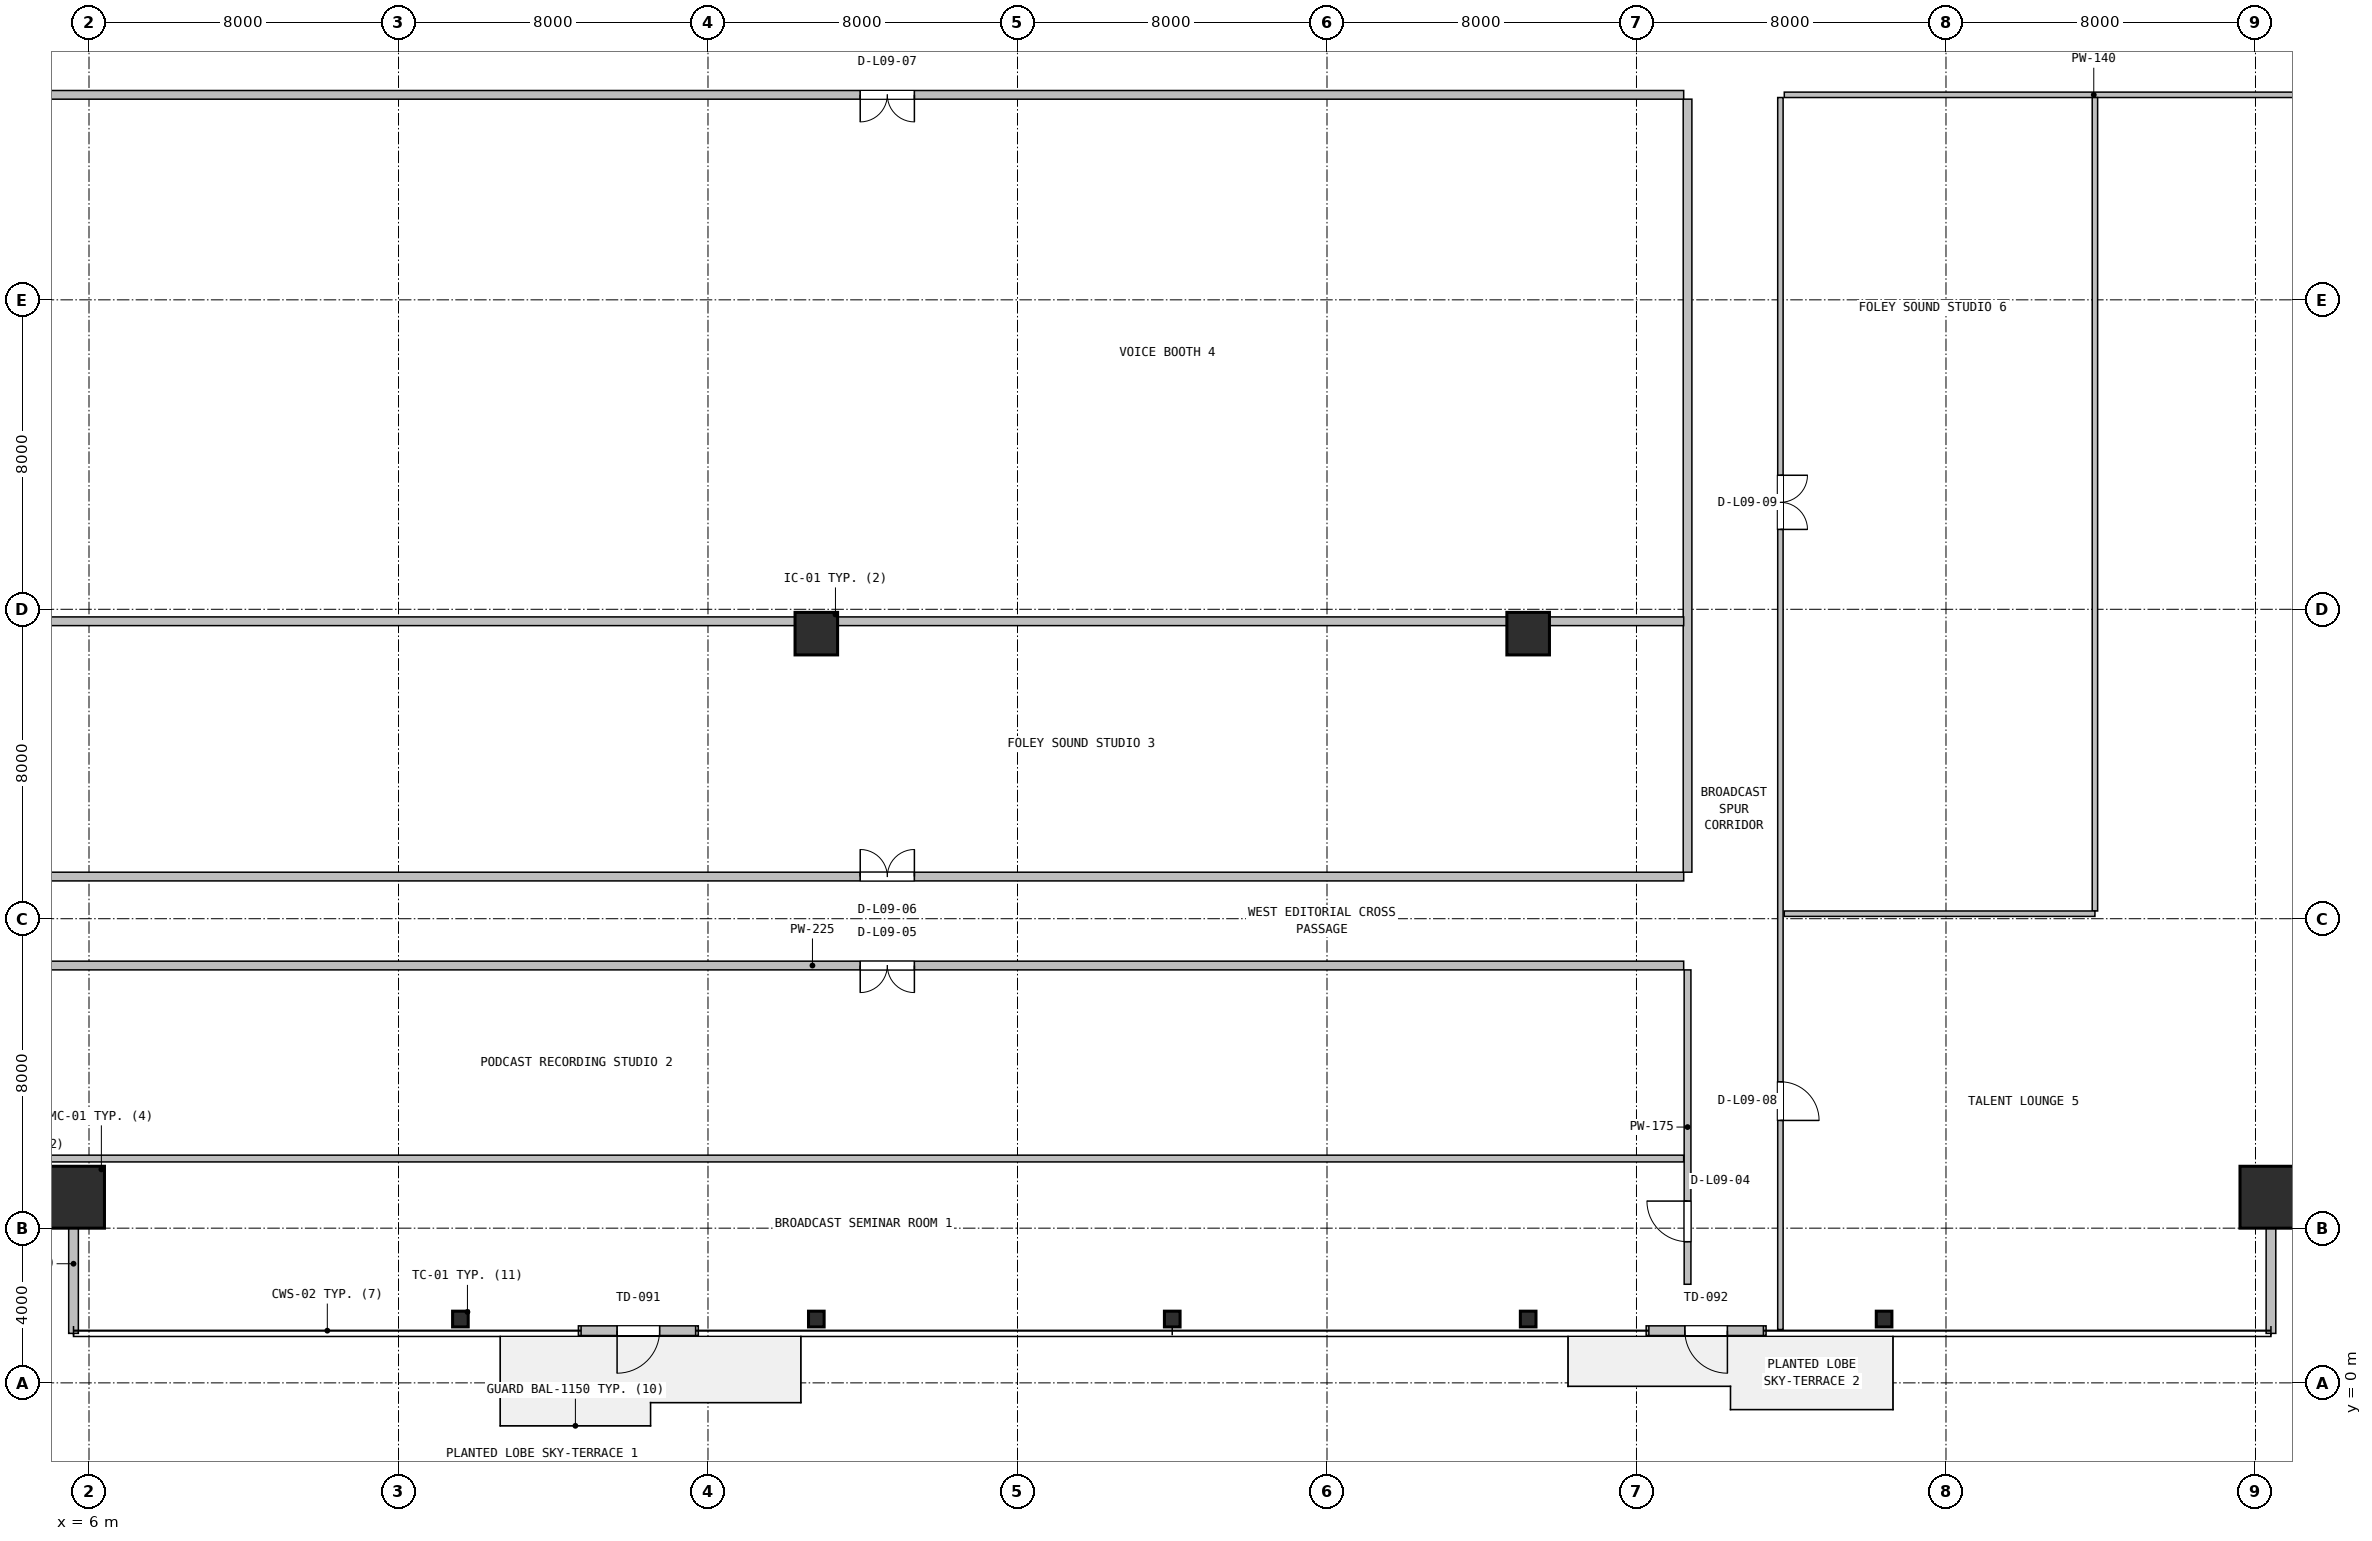
"""IFC4 building model, lengths in metres.
Left out: names, types, materials, properties, quantities, classifications, styles, units other than length and angle.
Written with IfcOpenShell. Run it as: python <this file> out.ifc"""

import sys

from ifc_helpers import new_model, si_unit, direction, frame, frame_2d, origin, origin_2d, place, context, subcontext, project, spatial, rectangle, hollow_rectangle, i_section, extrude, source, transform, mapped, element, fill, save


model = new_model("IFC4")
c1 = context("Model", 3, precision=1e-05, world=origin(), true_north=direction((0.0, 1.0)))
c2 = subcontext(c1, "Body", "Model", "MODEL_VIEW")
j1 = project(units=[si_unit("LENGTHUNIT", "METRE"), si_unit("PLANEANGLEUNIT", "RADIAN")], contexts=[c1])
p1 = place(None, origin())
s1 = spatial("IfcSite", under=j1, at=p1, CompositionType="ELEMENT")
p2 = place(p1, origin())
s2 = spatial("IfcBuilding", under=s1, at=p2, CompositionType="ELEMENT")
p3 = place(p2, frame((0.0, 0.0, 43.2)))
s3 = spatial("IfcBuildingStorey", under=s2, at=p3, CompositionType="ELEMENT", Elevation=43.2)
m1 = source(origin(), c2, "Body", "SweptSolid", [
    extrude(hollow_rectangle(XDim=1.6, YDim=1.6, WallThickness=0.06, at=origin_2d()), origin(), (0.0, 0.0, 1.0), 3.9),
])
for number, where, z_axis, x_axis in (
    (1, (5.6, 4.8, 0.0), (0.0, 0.0, 1.0), (1.0, 0.0, 0.0)),
    (2, (62.4, 4.8, 0.0), (0.0, 0.0, 1.0), (1.0, 0.0, 0.0)),
):
    element("IfcColumn", number, at=place(p3, frame(where, z_axis=z_axis, x_axis=x_axis)), inside=s3, PredefinedType="COLUMN", context=c2, shape_type="MappedRepresentation", body=[
        mapped(m1, transform((0.0, 0.0, 0.0), x_axis=(1.0, 0.0, 0.0), y_axis=(0.0, 1.0, 0.0), z_axis=(0.0, 0.0, 1.0), scale=1.0)),
    ])
m2 = source(origin(), c2, "Body", "SweptSolid", [
    extrude(i_section(OverallWidth=0.404, OverallDepth=0.407, WebThickness=0.027, FlangeThickness=0.044, FilletRadius=0.018, at=origin_2d()), origin(), (0.0, 0.0, 1.0), 3.9),
])
for number, where, z_axis, x_axis in (
    (3, (15.6, 1.65, 0.0), (0.0, 0.0, 1.0), (1.0, 0.0, 0.0)),
    (4, (24.8, 1.65, 0.0), (0.0, 0.0, 1.0), (1.0, 0.0, 0.0)),
    (5, (34.0, 1.65, 0.0), (0.0, 0.0, 1.0), (1.0, 0.0, 0.0)),
    (6, (43.2, 1.65, 0.0), (0.0, 0.0, 1.0), (1.0, 0.0, 0.0)),
    (7, (52.4, 1.65, 0.0), (0.0, 0.0, 1.0), (1.0, 0.0, 0.0)),
):
    element("IfcColumn", number, at=place(p3, frame(where, z_axis=z_axis, x_axis=x_axis)), inside=s3, PredefinedType="COLUMN", context=c2, shape_type="MappedRepresentation", body=[
        mapped(m2, transform((0.0, 0.0, 0.0), x_axis=(1.0, 0.0, 0.0), y_axis=(0.0, 1.0, 0.0), z_axis=(0.0, 0.0, 1.0), scale=1.0)),
    ])
m3 = source(origin(), c2, "Body", "SweptSolid", [
    extrude(rectangle(XDim=1.1, YDim=1.1, at=origin_2d()), origin(), (0.0, 0.0, 1.0), 3.9),
])
for number, where, z_axis, x_axis in (
    (8, (24.8, 19.37, 0.0), (0.0, 0.0, 1.0), (1.0, 0.0, 0.0)),
    (9, (43.2, 19.37, 0.0), (0.0, 0.0, 1.0), (1.0, 0.0, 0.0)),
):
    element("IfcColumn", number, at=place(p3, frame(where, z_axis=z_axis, x_axis=x_axis)), inside=s3, PredefinedType="COLUMN", context=c2, shape_type="MappedRepresentation", body=[
        mapped(m3, transform((0.0, 0.0, 0.0), x_axis=(1.0, 0.0, 0.0), y_axis=(0.0, 1.0, 0.0), z_axis=(0.0, 0.0, 1.0), scale=1.0)),
    ])
p4 = place(p3, frame((18.65, 1.35, 0.0), z_axis=(0.0, 0.0, 1.0), x_axis=(1.0, 0.0, 0.0)))
e10 = element("IfcWall", 10, at=p4, inside=s3, PredefinedType="SOLIDWALL", context=c2, shape_type="SweptSolid", body=[
    extrude(rectangle(XDim=3.1, YDim=0.25, at=frame_2d((1.55, 0.0))), origin(), (0.0, 0.0, 1.0), 3.63),
])
p5 = place(p4, frame((1.0, 0.0, 0.0)))
e11 = element("IfcOpeningElement", 11, at=p5, cuts=e10, PredefinedType="OPENING", context=c2, shape_type="SweptSolid", body=[
    extrude(rectangle(XDim=1.1, YDim=2.15, at=frame_2d((0.55, 1.075))), frame((0.0, 0.135, 0.0), z_axis=(0.0, -1.0, 0.0), x_axis=(1.0, 0.0, 0.0)), (0.0, 0.0, 1.0), 0.27),
])
p6 = place(p3, frame((46.25, 1.35, 0.0), z_axis=(0.0, 0.0, 1.0), x_axis=(1.0, 0.0, 0.0)))
e12 = element("IfcWall", 12, at=p6, inside=s3, PredefinedType="SOLIDWALL", context=c2, shape_type="SweptSolid", body=[
    extrude(rectangle(XDim=3.1, YDim=0.25, at=frame_2d((1.55, 0.0))), origin(), (0.0, 0.0, 1.0), 3.63),
])
p7 = place(p6, frame((1.0, 0.0, 0.0)))
e13 = element("IfcOpeningElement", 13, at=p7, cuts=e12, PredefinedType="OPENING", context=c2, shape_type="SweptSolid", body=[
    extrude(rectangle(XDim=1.1, YDim=2.15, at=frame_2d((0.55, 1.075))), frame((0.0, 0.135, 0.0), z_axis=(0.0, -1.0, 0.0), x_axis=(1.0, 0.0, 0.0)), (0.0, 0.0, 1.0), 0.27),
])
for number, where, z_axis, x_axis in (
    (14, (5.6, 1.28, 0.0), (0.0, 0.0, 1.0), (0.0, 1.0, 0.0)),
    (15, (62.4, 1.28, 0.0), (0.0, 0.0, 1.0), (0.0, 1.0, 0.0)),
):
    element("IfcWall", number, at=place(p3, frame(where, z_axis=z_axis, x_axis=x_axis)), inside=s3, PredefinedType="SOLIDWALL", context=c2, shape_type="SweptSolid", body=[
        extrude(rectangle(XDim=3.6, YDim=0.25, at=frame_2d((1.8, 0.0))), origin(), (0.0, 0.0, 1.0), 3.208),
    ])
p8 = place(p3, frame((47.32, 2.55, 0.0), z_axis=(0.0, 0.0, 1.0), x_axis=(0.0, 1.0, 0.0)))
e16 = element("IfcWall", 16, at=p8, inside=s3, PredefinedType="PARTITIONING", context=c2, shape_type="SweptSolid", body=[
    extrude(rectangle(XDim=8.127, YDim=0.175, at=frame_2d((4.063, 0.0))), origin(), (0.0, 0.0, 1.0), 3.322),
])
p9 = place(p8, frame((1.1, 0.0, 0.0)))
e17 = element("IfcOpeningElement", 17, at=p9, cuts=e16, PredefinedType="OPENING", context=c2, shape_type="SweptSolid", body=[
    extrude(rectangle(XDim=1.05, YDim=2.1, at=frame_2d((0.525, 1.05))), frame((0.0, 0.098, 0.0), z_axis=(0.0, -1.0, 0.0), x_axis=(1.0, 0.0, 0.0)), (0.0, 0.0, 1.0), 0.195),
])
p10 = place(p3, frame((2.18, 5.8, 0.0), z_axis=(0.0, 0.0, 1.0), x_axis=(1.0, 0.0, 0.0)))
e18 = element("IfcWall", 18, at=p10, inside=s3, PredefinedType="PARTITIONING", context=c2, shape_type="SweptSolid", body=[
    extrude(rectangle(XDim=45.04, YDim=0.175, at=frame_2d((22.52, 0.0))), origin(), (0.0, 0.0, 1.0), 2.852),
])
p11 = place(p3, frame((2.18, 10.79, 0.0), z_axis=(0.0, 0.0, 1.0), x_axis=(1.0, 0.0, 0.0)))
e19 = element("IfcWall", 19, at=p11, inside=s3, PredefinedType="PARTITIONING", context=c2, shape_type="SweptSolid", body=[
    extrude(rectangle(XDim=45.04, YDim=0.225, at=frame_2d((22.52, 0.0))), origin(), (0.0, 0.0, 1.0), 2.852),
])
p12 = place(p11, frame((23.755, 0.0, 0.0)))
e20 = element("IfcOpeningElement", 20, at=p12, cuts=e19, PredefinedType="OPENING", context=c2, shape_type="SweptSolid", body=[
    extrude(rectangle(XDim=1.4, YDim=2.12, at=frame_2d((0.7, 1.06))), frame((0.0, 0.123, 0.0), z_axis=(0.0, -1.0, 0.0), x_axis=(1.0, 0.0, 0.0)), (0.0, 0.0, 1.0), 0.245),
])
p13 = place(p3, frame((2.18, 13.09, 0.0), z_axis=(0.0, 0.0, 1.0), x_axis=(1.0, 0.0, 0.0)))
e21 = element("IfcWall", 21, at=p13, inside=s3, PredefinedType="PARTITIONING", context=c2, shape_type="SweptSolid", body=[
    extrude(rectangle(XDim=45.04, YDim=0.225, at=frame_2d((22.52, 0.0))), origin(), (0.0, 0.0, 1.0), 2.852),
])
p14 = place(p13, frame((23.755, 0.0, 0.0)))
e22 = element("IfcOpeningElement", 22, at=p14, cuts=e21, PredefinedType="OPENING", context=c2, shape_type="SweptSolid", body=[
    extrude(rectangle(XDim=1.4, YDim=2.12, at=frame_2d((0.7, 1.06))), frame((0.0, 0.123, 0.0), z_axis=(0.0, -1.0, 0.0), x_axis=(1.0, 0.0, 0.0)), (0.0, 0.0, 1.0), 0.245),
])
p15 = place(p3, frame((47.32, 13.203, 0.0), z_axis=(0.0, 0.0, 1.0), x_axis=(0.0, 1.0, 0.0)))
e23 = element("IfcWall", 23, at=p15, inside=s3, PredefinedType="PARTITIONING", context=c2, shape_type="SweptSolid", body=[
    extrude(rectangle(XDim=19.985, YDim=0.225, at=frame_2d((9.993, 0.0))), origin(), (0.0, 0.0, 1.0), 3.322),
])
p16 = place(p3, frame((2.18, 19.69, 0.0), z_axis=(0.0, 0.0, 1.0), x_axis=(1.0, 0.0, 0.0)))
e24 = element("IfcWall", 24, at=p16, inside=s3, PredefinedType="PARTITIONING", context=c2, shape_type="SweptSolid", body=[
    extrude(rectangle(XDim=45.04, YDim=0.225, at=frame_2d((22.52, 0.0))), origin(), (0.0, 0.0, 1.0), 2.852),
])
p17 = place(p3, frame((2.18, 33.3, 0.0), z_axis=(0.0, 0.0, 1.0), x_axis=(1.0, 0.0, 0.0)))
e25 = element("IfcWall", 25, at=p17, inside=s3, PredefinedType="PARTITIONING", context=c2, shape_type="SweptSolid", body=[
    extrude(rectangle(XDim=45.04, YDim=0.225, at=frame_2d((22.52, 0.0))), origin(), (0.0, 0.0, 1.0), 2.852),
])
p18 = place(p17, frame((23.755, 0.0, 0.0)))
e26 = element("IfcOpeningElement", 26, at=p18, cuts=e25, PredefinedType="OPENING", context=c2, shape_type="SweptSolid", body=[
    extrude(rectangle(XDim=1.4, YDim=2.12, at=frame_2d((0.7, 1.06))), frame((0.0, 0.123, 0.0), z_axis=(0.0, -1.0, 0.0), x_axis=(1.0, 0.0, 0.0)), (0.0, 0.0, 1.0), 0.245),
])
p19 = place(p3, frame((49.82, 33.3, 0.0), z_axis=(0.0, 0.0, 1.0), x_axis=(1.0, 0.0, 0.0)))
e27 = element("IfcWall", 27, at=p19, inside=s3, PredefinedType="PARTITIONING", context=c2, shape_type="SweptSolid", body=[
    extrude(rectangle(XDim=16.0, YDim=0.14, at=frame_2d((8.0, 0.0))), origin(), (0.0, 0.0, 1.0), 3.208),
])
p20 = place(p3, frame((57.85, 12.2, 0.0), z_axis=(0.0, 0.0, 1.0), x_axis=(0.0, 1.0, 0.0)))
e28 = element("IfcWall", 28, at=p20, inside=s3, PredefinedType="PARTITIONING", context=c2, shape_type="SweptSolid", body=[
    extrude(rectangle(XDim=21.03, YDim=0.14, at=frame_2d((10.515, 0.0))), origin(), (0.0, 0.0, 1.0), 3.322),
])
p21 = place(p3, frame((49.82, 12.13, 0.0), z_axis=(0.0, 0.0, 1.0), x_axis=(1.0, 0.0, 0.0)))
e29 = element("IfcWall", 29, at=p21, inside=s3, PredefinedType="PARTITIONING", context=c2, shape_type="SweptSolid", body=[
    extrude(rectangle(XDim=8.03, YDim=0.14, at=frame_2d((4.015, 0.0))), origin(), (0.0, 0.0, 1.0), 3.63),
])
p22 = place(p3, frame((49.72, 1.38, 0.0), z_axis=(0.0, 0.0, 1.0), x_axis=(0.0, 1.0, 0.0)))
e30 = element("IfcWall", 30, at=p22, inside=s3, PredefinedType="PARTITIONING", context=c2, shape_type="SweptSolid", body=[
    extrude(rectangle(XDim=31.85, YDim=0.14, at=frame_2d((15.925, 0.0))), origin(), (0.0, 0.0, 1.0), 3.208),
])
p23 = place(p22, frame((5.405, 0.0, 0.0)))
e31 = element("IfcOpeningElement", 31, at=p23, cuts=e30, PredefinedType="OPENING", context=c2, shape_type="SweptSolid", body=[
    extrude(rectangle(XDim=1.0, YDim=2.1, at=frame_2d((0.5, 1.05))), frame((0.0, 0.08, 0.0), z_axis=(0.0, -1.0, 0.0), x_axis=(1.0, 0.0, 0.0)), (0.0, 0.0, 1.0), 0.16),
])
p24 = place(p22, frame((20.685, 0.0, 0.0)))
e32 = element("IfcOpeningElement", 32, at=p24, cuts=e30, PredefinedType="OPENING", context=c2, shape_type="SweptSolid", body=[
    extrude(rectangle(XDim=1.4, YDim=2.12, at=frame_2d((0.7, 1.06))), frame((0.0, 0.08, 0.0), z_axis=(0.0, -1.0, 0.0), x_axis=(1.0, 0.0, 0.0)), (0.0, 0.0, 1.0), 0.16),
])
m4 = source(origin(), c2, "Body", "SweptSolid", [
    extrude(rectangle(XDim=1.1, YDim=2.15, at=frame_2d((0.55, 1.075))), frame((0.0, 0.025, 0.0), z_axis=(0.0, -1.0, 0.0), x_axis=(1.0, 0.0, 0.0)), (0.0, 0.0, 1.0), 0.05),
])
p25 = place(p5, frame((1.1, 0.0, 0.0), z_axis=(0.0, 0.0, 1.0), x_axis=(-1.0, 0.0, 0.0)))
e33 = element("IfcDoor", 33, at=p25, inside=s3, OperationType="SINGLE_SWING_LEFT", PredefinedType="DOOR", context=c2, shape_type="MappedRepresentation", body=[
    mapped(m4, transform((0.0, 0.0, 0.0), x_axis=(1.0, 0.0, 0.0), y_axis=(0.0, 1.0, 0.0), z_axis=(0.0, 0.0, 1.0), scale=1.0)),
])
fill(e11, e33)
p26 = place(p7, frame((1.1, 0.0, 0.0), z_axis=(0.0, 0.0, 1.0), x_axis=(-1.0, 0.0, 0.0)))
e34 = element("IfcDoor", 34, at=p26, inside=s3, OperationType="SINGLE_SWING_RIGHT", PredefinedType="DOOR", context=c2, shape_type="MappedRepresentation", body=[
    mapped(m4, transform((0.0, 0.0, 0.0), x_axis=(1.0, 0.0, 0.0), y_axis=(0.0, 1.0, 0.0), z_axis=(0.0, 0.0, 1.0), scale=1.0)),
])
fill(e13, e34)
m5 = source(origin(), c2, "Body", "SweptSolid", [
    extrude(rectangle(XDim=1.05, YDim=2.1, at=frame_2d((0.525, 1.05))), frame((0.0, 0.025, 0.0), z_axis=(0.0, -1.0, 0.0), x_axis=(1.0, 0.0, 0.0)), (0.0, 0.0, 1.0), 0.05),
])
p27 = place(p9, origin())
e35 = element("IfcDoor", 35, at=p27, inside=s3, OperationType="SINGLE_SWING_RIGHT", PredefinedType="DOOR", context=c2, shape_type="MappedRepresentation", body=[
    mapped(m5, transform((0.0, 0.0, 0.0), x_axis=(1.0, 0.0, 0.0), y_axis=(0.0, 1.0, 0.0), z_axis=(0.0, 0.0, 1.0), scale=1.0)),
])
fill(e17, e35)
m6 = source(origin(), c2, "Body", "SweptSolid", [
    extrude(rectangle(XDim=1.4, YDim=2.12, at=frame_2d((0.7, 1.06))), frame((0.0, 0.025, 0.0), z_axis=(0.0, -1.0, 0.0), x_axis=(1.0, 0.0, 0.0)), (0.0, 0.0, 1.0), 0.05),
])
p28 = place(p12, frame((1.4, 0.0, 0.0), z_axis=(0.0, 0.0, 1.0), x_axis=(-1.0, 0.0, 0.0)))
e36 = element("IfcDoor", 36, at=p28, inside=s3, OperationType="DOUBLE_DOOR_SINGLE_SWING", PredefinedType="DOOR", context=c2, shape_type="MappedRepresentation", body=[
    mapped(m6, transform((0.0, 0.0, 0.0), x_axis=(1.0, 0.0, 0.0), y_axis=(0.0, 1.0, 0.0), z_axis=(0.0, 0.0, 1.0), scale=1.0)),
])
fill(e20, e36)
p29 = place(p14, origin())
e37 = element("IfcDoor", 37, at=p29, inside=s3, OperationType="DOUBLE_DOOR_SINGLE_SWING", PredefinedType="DOOR", context=c2, shape_type="MappedRepresentation", body=[
    mapped(m6, transform((0.0, 0.0, 0.0), x_axis=(1.0, 0.0, 0.0), y_axis=(0.0, 1.0, 0.0), z_axis=(0.0, 0.0, 1.0), scale=1.0)),
])
fill(e22, e37)
p30 = place(p18, frame((1.4, 0.0, 0.0), z_axis=(0.0, 0.0, 1.0), x_axis=(-1.0, 0.0, 0.0)))
e38 = element("IfcDoor", 38, at=p30, inside=s3, OperationType="DOUBLE_DOOR_SINGLE_SWING", PredefinedType="DOOR", context=c2, shape_type="MappedRepresentation", body=[
    mapped(m6, transform((0.0, 0.0, 0.0), x_axis=(1.0, 0.0, 0.0), y_axis=(0.0, 1.0, 0.0), z_axis=(0.0, 0.0, 1.0), scale=1.0)),
])
fill(e26, e38)
m7 = source(origin(), c2, "Body", "SweptSolid", [
    extrude(rectangle(XDim=1.0, YDim=2.1, at=frame_2d((0.5, 1.05))), frame((0.0, 0.025, 0.0), z_axis=(0.0, -1.0, 0.0), x_axis=(1.0, 0.0, 0.0)), (0.0, 0.0, 1.0), 0.05),
])
p31 = place(p23, frame((1.0, 0.0, 0.0), z_axis=(0.0, 0.0, 1.0), x_axis=(-1.0, 0.0, 0.0)))
e39 = element("IfcDoor", 39, at=p31, inside=s3, OperationType="SINGLE_SWING_LEFT", PredefinedType="DOOR", context=c2, shape_type="MappedRepresentation", body=[
    mapped(m7, transform((0.0, 0.0, 0.0), x_axis=(1.0, 0.0, 0.0), y_axis=(0.0, 1.0, 0.0), z_axis=(0.0, 0.0, 1.0), scale=1.0)),
])
fill(e31, e39)
p32 = place(p24, frame((1.4, 0.0, 0.0), z_axis=(0.0, 0.0, 1.0), x_axis=(-1.0, 0.0, 0.0)))
e40 = element("IfcDoor", 40, at=p32, inside=s3, OperationType="DOUBLE_DOOR_SINGLE_SWING", PredefinedType="DOOR", context=c2, shape_type="MappedRepresentation", body=[
    mapped(m6, transform((0.0, 0.0, 0.0), x_axis=(1.0, 0.0, 0.0), y_axis=(0.0, 1.0, 0.0), z_axis=(0.0, 0.0, 1.0), scale=1.0)),
])
fill(e32, e40)
save(model, sys.argv[1])
